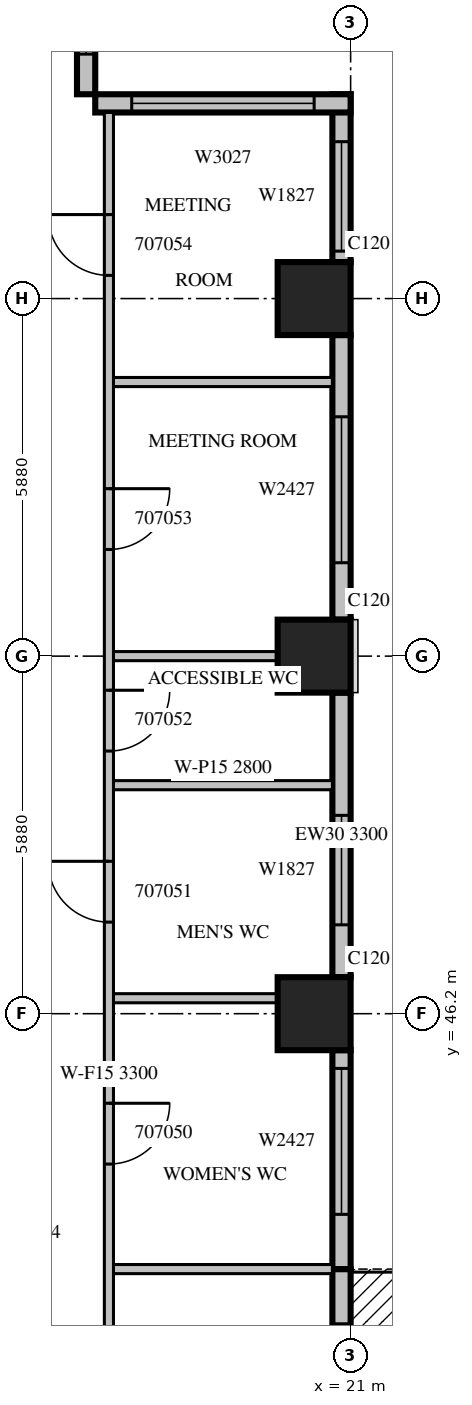
"""IFC4 building model, lengths in metres.
Left out: names, types, materials, properties, quantities, classifications, styles, units other than length and angle.
Written with IfcOpenShell. Run it as: python <this file> out.ifc"""

import sys

from ifc_helpers import new_model, si_unit, direction, frame, frame_2d, origin, origin_2d, place, context, subcontext, project, spatial, rectangle, extrude, source, transform, mapped, element, fill, save


model = new_model("IFC4")
c1 = context("Model", 3, precision=1e-05, world=origin(), true_north=direction((0.0, 1.0)))
c2 = subcontext(c1, "Body", "Model", "MODEL_VIEW")
j1 = project(units=[si_unit("LENGTHUNIT", "METRE"), si_unit("PLANEANGLEUNIT", "RADIAN")], contexts=[c1])
p1 = place(None, origin())
s1 = spatial("IfcSite", under=j1, at=p1, CompositionType="ELEMENT")
p2 = place(p1, origin())
s2 = spatial("IfcBuilding", under=s1, at=p2, CompositionType="ELEMENT")
p3 = place(p2, frame((0.0, 0.0, 40.5)))
s3 = spatial("IfcBuildingStorey", under=s2, at=p3, CompositionType="ELEMENT", Elevation=40.5)
m1 = source(origin(), c2, "Body", "SweptSolid", [
    extrude(rectangle(XDim=1.2, YDim=1.2, at=origin_2d()), origin(), (0.0, 0.0, 1.0), 4.2),
])
for number, where, z_axis, x_axis in (
    (1, (20.4, 46.2, 0.0), (0.0, 0.0, 1.0), (1.0, 0.0, 0.0)),
    (2, (20.4, 52.08, 0.0), (0.0, 0.0, 1.0), (1.0, 0.0, 0.0)),
    (3, (20.4, 57.96, 0.0), (0.0, 0.0, 1.0), (1.0, 0.0, 0.0)),
):
    element("IfcColumn", number, at=place(p3, frame(where, z_axis=z_axis, x_axis=x_axis)), inside=s3, PredefinedType="COLUMN", context=c2, shape_type="MappedRepresentation", body=[
        mapped(m1, transform((0.0, 0.0, 0.0), scale=1.0)),
    ])
m2 = source(origin(), c2, "Body", "SweptSolid", [
    extrude(rectangle(XDim=3.6, YDim=0.3, at=frame_2d((1.8, 0.0))), origin(), (0.0, 0.0, 1.0), 3.8),
])
p4 = place(p3, frame((20.85, 38.4, 0.0), z_axis=(0.0, 0.0, 1.0), x_axis=(0.0, 1.0, 0.0)))
e4 = element("IfcWall", 4, at=p4, inside=s3, PredefinedType="STANDARD", context=c2, shape_type="MappedRepresentation", body=[
    mapped(m2, transform((0.0, 0.0, 0.0), scale=1.0)),
])
m3 = source(origin(), c2, "Body", "SweptSolid", [
    extrude(rectangle(XDim=1.8, YDim=2.4, at=frame_2d((0.9, 1.2))), frame((0.0, 0.16, 0.0), z_axis=(0.0, -1.0, 0.0), x_axis=(1.0, 0.0, 0.0)), (0.0, 0.0, 1.0), 0.32),
])
p5 = place(p4, frame((0.9, 0.0, 0.0)))
e5 = element("IfcOpeningElement", 5, at=p5, cuts=e4, PredefinedType="OPENING", context=c2, shape_type="MappedRepresentation", body=[
    mapped(m3, transform((0.0, 0.0, 0.0), scale=1.0)),
])
p6 = place(p3, frame((20.85, 42.0, 0.0), z_axis=(0.0, 0.0, 1.0), x_axis=(0.0, 1.0, 0.0)))
e6 = element("IfcWall", 6, at=p6, inside=s3, PredefinedType="STANDARD", context=c2, shape_type="MappedRepresentation", body=[
    mapped(m2, transform((0.0, 0.0, 0.0), scale=1.0)),
])
m4 = source(origin(), c2, "Body", "SweptSolid", [
    extrude(rectangle(XDim=2.4, YDim=2.7, at=frame_2d((1.2, 1.35))), frame((0.0, 0.16, 0.0), z_axis=(0.0, -1.0, 0.0), x_axis=(1.0, 0.0, 0.0)), (0.0, 0.0, 1.0), 0.32),
])
p7 = place(p6, frame((0.9, 0.0, 0.6)))
e7 = element("IfcOpeningElement", 7, at=p7, cuts=e6, PredefinedType="OPENING", context=c2, shape_type="MappedRepresentation", body=[
    mapped(m4, transform((0.0, 0.0, 0.0), scale=1.0)),
])
m5 = source(origin(), c2, "Body", "SweptSolid", [
    extrude(rectangle(XDim=4.68, YDim=0.3, at=frame_2d((2.34, 0.0))), origin(), (0.0, 0.0, 1.0), 3.3),
])
p8 = place(p3, frame((20.85, 46.8, 0.0), z_axis=(0.0, 0.0, 1.0), x_axis=(0.0, 1.0, 0.0)))
e8 = element("IfcWall", 8, at=p8, inside=s3, PredefinedType="STANDARD", context=c2, shape_type="MappedRepresentation", body=[
    mapped(m5, transform((0.0, 0.0, 0.0), scale=1.0)),
])
m6 = source(origin(), c2, "Body", "SweptSolid", [
    extrude(rectangle(XDim=1.8, YDim=2.7, at=frame_2d((0.9, 1.35))), frame((0.0, 0.16, 0.0), z_axis=(0.0, -1.0, 0.0), x_axis=(1.0, 0.0, 0.0)), (0.0, 0.0, 1.0), 0.32),
])
p9 = place(p8, frame((0.862, 0.0, 0.6)))
e9 = element("IfcOpeningElement", 9, at=p9, cuts=e8, PredefinedType="OPENING", context=c2, shape_type="MappedRepresentation", body=[
    mapped(m6, transform((0.0, 0.0, 0.0), scale=1.0)),
])
m7 = source(origin(), c2, "Body", "SweptSolid", [
    extrude(rectangle(XDim=4.68, YDim=0.3, at=frame_2d((2.34, 0.0))), origin(), (0.0, 0.0, 1.0), 3.8),
])
p10 = place(p3, frame((20.85, 52.68, 0.0), z_axis=(0.0, 0.0, 1.0), x_axis=(0.0, 1.0, 0.0)))
e10 = element("IfcWall", 10, at=p10, inside=s3, PredefinedType="STANDARD", context=c2, shape_type="MappedRepresentation", body=[
    mapped(m7, transform((0.0, 0.0, 0.0), scale=1.0)),
])
p11 = place(p10, frame((0.936, 0.0, 0.6)))
e11 = element("IfcOpeningElement", 11, at=p11, cuts=e10, PredefinedType="OPENING", context=c2, shape_type="MappedRepresentation", body=[
    mapped(m4, transform((0.0, 0.0, 0.0), scale=1.0)),
])
m8 = source(origin(), c2, "Body", "SweptSolid", [
    extrude(rectangle(XDim=2.76, YDim=0.3, at=frame_2d((1.38, 0.0))), origin(), (0.0, 0.0, 1.0), 3.8),
])
p12 = place(p3, frame((20.85, 58.56, 0.0), z_axis=(0.0, 0.0, 1.0), x_axis=(0.0, 1.0, 0.0)))
e12 = element("IfcWall", 12, at=p12, inside=s3, PredefinedType="STANDARD", context=c2, shape_type="MappedRepresentation", body=[
    mapped(m8, transform((0.0, 0.0, 0.0), scale=1.0)),
])
p13 = place(p12, frame((0.18, 0.0, 0.6)))
e13 = element("IfcOpeningElement", 13, at=p13, cuts=e12, PredefinedType="OPENING", context=c2, shape_type="MappedRepresentation", body=[
    mapped(m6, transform((0.0, 0.0, 0.0), scale=1.0)),
])
m9 = source(origin(), c2, "Body", "SweptSolid", [
    extrude(rectangle(XDim=4.2, YDim=0.3, at=frame_2d((2.1, 0.0))), origin(), (0.0, 0.0, 1.0), 3.8),
])
p14 = place(p3, frame((21.0, 61.17, 0.0), z_axis=(0.0, 0.0, 1.0), x_axis=(-1.0, 0.0, 0.0)))
e14 = element("IfcWall", 14, at=p14, inside=s3, PredefinedType="STANDARD", context=c2, shape_type="MappedRepresentation", body=[
    mapped(m9, transform((0.0, 0.0, 0.0), scale=1.0)),
])
m10 = source(origin(), c2, "Body", "SweptSolid", [
    extrude(rectangle(XDim=3.0, YDim=2.7, at=frame_2d((1.5, 1.35))), frame((0.0, 0.16, 0.0), z_axis=(0.0, -1.0, 0.0), x_axis=(1.0, 0.0, 0.0)), (0.0, 0.0, 1.0), 0.32),
])
p15 = place(p14, frame((0.6, 0.0, 0.6)))
e15 = element("IfcOpeningElement", 15, at=p15, cuts=e14, PredefinedType="OPENING", context=c2, shape_type="MappedRepresentation", body=[
    mapped(m10, transform((0.0, 0.0, 0.0), scale=1.0)),
])
m11 = source(origin(), c2, "Body", "SweptSolid", [
    extrude(rectangle(XDim=2.52, YDim=0.3, at=frame_2d((1.26, 0.0))), origin(), (0.0, 0.0, 1.0), 3.8),
])
p16 = place(p3, frame((16.65, 61.32, 0.0), z_axis=(0.0, 0.0, 1.0), x_axis=(0.0, 1.0, 0.0)))
e16 = element("IfcWall", 16, at=p16, inside=s3, PredefinedType="STANDARD", context=c2, shape_type="MappedRepresentation", body=[
    mapped(m11, transform((0.0, 0.0, 0.0), scale=1.0)),
])
m12 = source(origin(), c2, "Body", "SweptSolid", [
    extrude(rectangle(XDim=1.2, YDim=2.7, at=frame_2d((0.6, 1.35))), frame((0.0, 0.16, 0.0), z_axis=(0.0, -1.0, 0.0), x_axis=(1.0, 0.0, 0.0)), (0.0, 0.0, 1.0), 0.32),
])
p17 = place(p16, frame((0.66, 0.0, 0.6)))
e17 = element("IfcOpeningElement", 17, at=p17, cuts=e16, PredefinedType="OPENING", context=c2, shape_type="MappedRepresentation", body=[
    mapped(m12, transform((0.0, 0.0, 0.0), scale=1.0)),
])
m13 = source(origin(), c2, "Body", "SweptSolid", [
    extrude(rectangle(XDim=2.701, YDim=0.15, at=frame_2d((1.351, 0.0))), origin(), (0.0, 0.0, 1.0), 3.8),
])
p18 = place(p3, frame((17.1, 46.454, 0.0), z_axis=(0.0, 0.0, 1.0), x_axis=(1.0, 0.0, 0.0)))
e18 = element("IfcWall", 18, at=p18, inside=s3, PredefinedType="PARTITIONING", context=c2, shape_type="MappedRepresentation", body=[
    mapped(m13, transform((0.0, 0.0, 0.0), scale=1.0)),
])
p19 = place(p3, frame((17.1, 49.958, 0.0), z_axis=(0.0, 0.0, 1.0), x_axis=(1.0, 0.0, 0.0)))
e19 = element("IfcWall", 19, at=p19, inside=s3, PredefinedType="PARTITIONING", context=c2, shape_type="SweptSolid", body=[
    extrude(rectangle(XDim=3.6, YDim=0.15, at=frame_2d((1.8, 0.0))), origin(), (0.0, 0.0, 1.0), 2.8),
])
m14 = source(origin(), c2, "Body", "SweptSolid", [
    extrude(rectangle(XDim=3.6, YDim=0.15, at=frame_2d((1.8, 0.0))), origin(), (0.0, 0.0, 1.0), 3.8),
])
for number, where, z_axis, x_axis in (
    (20, (17.1, 56.587, 0.0), (0.0, 0.0, 1.0), (1.0, 0.0, 0.0)),
    (21, (20.7, 42.0, 0.0), (0.0, 0.0, 1.0), (-1.0, 0.0, 0.0)),
):
    element("IfcWall", number, at=place(p3, frame(where, z_axis=z_axis, x_axis=x_axis)), inside=s3, PredefinedType="PARTITIONING", context=c2, shape_type="MappedRepresentation", body=[
        mapped(m14, transform((0.0, 0.0, 0.0), scale=1.0)),
    ])
p20 = place(p3, frame((19.801, 52.08, 0.0), z_axis=(0.0, 0.0, 1.0), x_axis=(-1.0, 0.0, 0.0)))
e22 = element("IfcWall", 22, at=p20, inside=s3, PredefinedType="PARTITIONING", context=c2, shape_type="MappedRepresentation", body=[
    mapped(m13, transform((0.0, 0.0, 0.0), scale=1.0)),
])
p21 = place(p3, frame((17.025, 61.02, 0.0), z_axis=(0.0, 0.0, 1.0), x_axis=(0.0, -1.0, 0.0)))
e23 = element("IfcWall", 23, at=p21, inside=s3, PredefinedType="PARTITIONING", context=c2, shape_type="SweptSolid", body=[
    extrude(rectangle(XDim=31.62, YDim=0.15, at=frame_2d((15.81, 0.0))), origin(), (0.0, 0.0, 1.0), 3.3),
])
m15 = source(origin(), c2, "Body", "SweptSolid", [
    extrude(rectangle(XDim=1.0, YDim=2.1, at=frame_2d((0.5, 1.05))), frame((0.0, 0.085, 0.0), z_axis=(0.0, -1.0, 0.0), x_axis=(1.0, 0.0, 0.0)), (0.0, 0.0, 1.0), 0.17),
])
p22 = place(p21, frame((29.263, 0.0, 0.0)))
e24 = element("IfcOpeningElement", 24, at=p22, cuts=e23, PredefinedType="OPENING", context=c2, shape_type="MappedRepresentation", body=[
    mapped(m15, transform((0.0, 0.0, 0.0), scale=1.0)),
])
p23 = place(p21, frame((25.951, 0.0, 0.0)))
e25 = element("IfcOpeningElement", 25, at=p23, cuts=e23, PredefinedType="OPENING", context=c2, shape_type="MappedRepresentation", body=[
    mapped(m15, transform((0.0, 0.0, 0.0), scale=1.0)),
])
p24 = place(p21, frame((23.608, 0.0, 0.0)))
e26 = element("IfcOpeningElement", 26, at=p24, cuts=e23, PredefinedType="OPENING", context=c2, shape_type="MappedRepresentation", body=[
    mapped(m15, transform((0.0, 0.0, 0.0), scale=1.0)),
])
p25 = place(p21, frame((20.62, 0.0, 0.0)))
e27 = element("IfcOpeningElement", 27, at=p25, cuts=e23, PredefinedType="OPENING", context=c2, shape_type="MappedRepresentation", body=[
    mapped(m15, transform((0.0, 0.0, 0.0), scale=1.0)),
])
p26 = place(p21, frame((16.293, 0.0, 0.0)))
e28 = element("IfcOpeningElement", 28, at=p26, cuts=e23, PredefinedType="OPENING", context=c2, shape_type="MappedRepresentation", body=[
    mapped(m15, transform((0.0, 0.0, 0.0), scale=1.0)),
])
p27 = place(p21, frame((12.314, 0.0, 0.0)))
e29 = element("IfcOpeningElement", 29, at=p27, cuts=e23, PredefinedType="OPENING", context=c2, shape_type="MappedRepresentation", body=[
    mapped(m15, transform((0.0, 0.0, 0.0), scale=1.0)),
])
p28 = place(p21, frame((9.501, 0.0, 0.0)))
e30 = element("IfcOpeningElement", 30, at=p28, cuts=e23, PredefinedType="OPENING", context=c2, shape_type="MappedRepresentation", body=[
    mapped(m15, transform((0.0, 0.0, 0.0), scale=1.0)),
])
p29 = place(p21, frame((6.186, 0.0, 0.0)))
e31 = element("IfcOpeningElement", 31, at=p29, cuts=e23, PredefinedType="OPENING", context=c2, shape_type="MappedRepresentation", body=[
    mapped(m15, transform((0.0, 0.0, 0.0), scale=1.0)),
])
p30 = place(p21, frame((1.679, 0.0, 0.0)))
e32 = element("IfcOpeningElement", 32, at=p30, cuts=e23, PredefinedType="OPENING", context=c2, shape_type="MappedRepresentation", body=[
    mapped(m15, transform((0.0, 0.0, 0.0), scale=1.0)),
])
m16 = source(origin(), c2, "Body", "SweptSolid", [
    extrude(rectangle(XDim=1.8, YDim=2.4, at=frame_2d((0.9, 1.2))), frame((0.0, 0.025, 0.0), z_axis=(0.0, -1.0, 0.0), x_axis=(1.0, 0.0, 0.0)), (0.0, 0.0, 1.0), 0.05),
])
p31 = place(p5, origin())
e33 = element("IfcDoor", 33, at=p31, inside=s3, OperationType="SLIDING_TO_LEFT", PredefinedType="DOOR", context=c2, shape_type="MappedRepresentation", body=[
    mapped(m16, transform((0.0, 0.0, 0.0), scale=1.0)),
])
fill(e5, e33)
m17 = source(origin(), c2, "Body", "SweptSolid", [
    extrude(rectangle(XDim=2.4, YDim=2.7, at=frame_2d((1.2, 1.35))), frame((0.0, 0.03, 0.0), z_axis=(0.0, -1.0, 0.0), x_axis=(1.0, 0.0, 0.0)), (0.0, 0.0, 1.0), 0.06),
])
p32 = place(p7, origin())
e34 = element("IfcWindow", 34, at=p32, inside=s3, PartitioningType="SINGLE_PANEL", PredefinedType="WINDOW", context=c2, shape_type="MappedRepresentation", body=[
    mapped(m17, transform((0.0, 0.0, 0.0), scale=1.0)),
])
fill(e7, e34)
m18 = source(origin(), c2, "Body", "SweptSolid", [
    extrude(rectangle(XDim=1.8, YDim=2.7, at=frame_2d((0.9, 1.35))), frame((0.0, 0.03, 0.0), z_axis=(0.0, -1.0, 0.0), x_axis=(1.0, 0.0, 0.0)), (0.0, 0.0, 1.0), 0.06),
])
p33 = place(p9, origin())
e35 = element("IfcWindow", 35, at=p33, inside=s3, PartitioningType="SINGLE_PANEL", PredefinedType="WINDOW", context=c2, shape_type="MappedRepresentation", body=[
    mapped(m18, transform((0.0, 0.0, 0.0), scale=1.0)),
])
fill(e9, e35)
p34 = place(p11, origin())
e36 = element("IfcWindow", 36, at=p34, inside=s3, PartitioningType="SINGLE_PANEL", PredefinedType="WINDOW", context=c2, shape_type="MappedRepresentation", body=[
    mapped(m17, transform((0.0, 0.0, 0.0), scale=1.0)),
])
fill(e11, e36)
p35 = place(p13, origin())
e37 = element("IfcWindow", 37, at=p35, inside=s3, PartitioningType="SINGLE_PANEL", PredefinedType="WINDOW", context=c2, shape_type="MappedRepresentation", body=[
    mapped(m18, transform((0.0, 0.0, 0.0), scale=1.0)),
])
fill(e13, e37)
m19 = source(origin(), c2, "Body", "SweptSolid", [
    extrude(rectangle(XDim=3.0, YDim=2.7, at=frame_2d((1.5, 1.35))), frame((0.0, 0.03, 0.0), z_axis=(0.0, -1.0, 0.0), x_axis=(1.0, 0.0, 0.0)), (0.0, 0.0, 1.0), 0.06),
])
p36 = place(p15, origin())
e38 = element("IfcWindow", 38, at=p36, inside=s3, PartitioningType="SINGLE_PANEL", PredefinedType="WINDOW", context=c2, shape_type="MappedRepresentation", body=[
    mapped(m19, transform((0.0, 0.0, 0.0), scale=1.0)),
])
fill(e15, e38)
m20 = source(origin(), c2, "Body", "SweptSolid", [
    extrude(rectangle(XDim=1.2, YDim=2.7, at=frame_2d((0.6, 1.35))), frame((0.0, 0.03, 0.0), z_axis=(0.0, -1.0, 0.0), x_axis=(1.0, 0.0, 0.0)), (0.0, 0.0, 1.0), 0.06),
])
p37 = place(p17, origin())
e39 = element("IfcWindow", 39, at=p37, inside=s3, PartitioningType="SINGLE_PANEL", PredefinedType="WINDOW", context=c2, shape_type="MappedRepresentation", body=[
    mapped(m20, transform((0.0, 0.0, 0.0), scale=1.0)),
])
fill(e17, e39)
m21 = source(origin(), c2, "Body", "SweptSolid", [
    extrude(rectangle(XDim=1.0, YDim=2.1, at=frame_2d((0.5, 1.05))), frame((0.0, 0.025, 0.0), z_axis=(0.0, -1.0, 0.0), x_axis=(1.0, 0.0, 0.0)), (0.0, 0.0, 1.0), 0.05),
])
p38 = place(p26, origin())
e40 = element("IfcDoor", 40, at=p38, inside=s3, OperationType="SINGLE_SWING_LEFT", PredefinedType="DOOR", context=c2, shape_type="MappedRepresentation", body=[
    mapped(m21, transform((0.0, 0.0, 0.0), scale=1.0)),
])
fill(e28, e40)
p39 = place(p27, origin())
e41 = element("IfcDoor", 41, at=p39, inside=s3, OperationType="SINGLE_SWING_RIGHT", PredefinedType="DOOR", context=c2, shape_type="MappedRepresentation", body=[
    mapped(m21, transform((0.0, 0.0, 0.0), scale=1.0)),
])
fill(e29, e41)
p40 = place(p28, origin())
e42 = element("IfcDoor", 42, at=p40, inside=s3, OperationType="SINGLE_SWING_LEFT", PredefinedType="DOOR", context=c2, shape_type="MappedRepresentation", body=[
    mapped(m21, transform((0.0, 0.0, 0.0), scale=1.0)),
])
fill(e30, e42)
p41 = place(p29, origin())
e43 = element("IfcDoor", 43, at=p41, inside=s3, OperationType="SINGLE_SWING_LEFT", PredefinedType="DOOR", context=c2, shape_type="MappedRepresentation", body=[
    mapped(m21, transform((0.0, 0.0, 0.0), scale=1.0)),
])
fill(e31, e43)
p42 = place(p30, origin())
e44 = element("IfcDoor", 44, at=p42, inside=s3, OperationType="SINGLE_SWING_RIGHT", PredefinedType="DOOR", context=c2, shape_type="MappedRepresentation", body=[
    mapped(m21, transform((0.0, 0.0, 0.0), scale=1.0)),
])
fill(e32, e44)
save(model, sys.argv[1])
